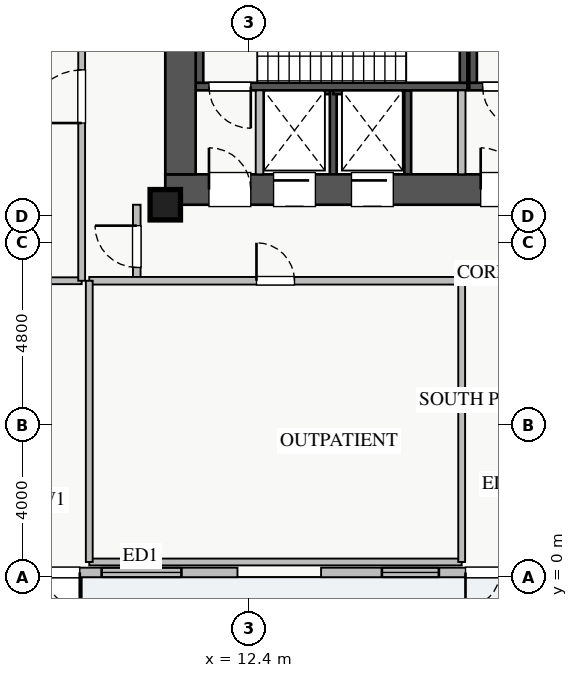
"""IFC4 building model, lengths in metres.
Left out: names, types, materials, properties, quantities, classifications, styles, units other than length and angle.
Written with IfcOpenShell. Run it as: python <this file> out.ifc"""

import sys

from ifc_helpers import new_model, si_unit, direction, frame, frame_2d, origin, origin_2d, place, context, subcontext, project, spatial, rectangle, extrude, source, transform, mapped, element, fill, save


model = new_model("IFC4")
c1 = context("Model", 3, precision=1e-05, world=origin(), true_north=direction((0.0, 1.0)))
c2 = subcontext(c1, "Body", "Model", "MODEL_VIEW")
j1 = project(units=[si_unit("LENGTHUNIT", "METRE"), si_unit("PLANEANGLEUNIT", "RADIAN")], contexts=[c1])
p1 = place(None, origin())
s1 = spatial("IfcSite", under=j1, at=p1, CompositionType="ELEMENT")
p2 = place(p1, origin())
s2 = spatial("IfcBuilding", under=s1, at=p2, CompositionType="ELEMENT")
p3 = place(p2, origin())
s3 = spatial("IfcBuildingStorey", under=s2, at=p3, CompositionType="ELEMENT", Elevation=0.0)
p4 = place(p3, frame((12.68, 12.8, 0.0), z_axis=(0.0, 0.0, 1.0), x_axis=(1.0, 0.0, 0.0)))
e1 = element("IfcWall", 1, at=p4, inside=s3, PredefinedType="SHEAR", context=c2, shape_type="SweptSolid", body=[
    extrude(rectangle(XDim=1.94, YDim=0.18, at=frame_2d((0.97, 0.0))), origin(), (0.0, 0.0, 1.0), 4.78),
])
p5 = place(p3, frame((14.62, 10.6, 0.0), z_axis=(0.0, 0.0, 1.0), x_axis=(0.0, 1.0, 0.0)))
e2 = element("IfcWall", 2, at=p5, inside=s3, PredefinedType="SHEAR", context=c2, shape_type="SweptSolid", body=[
    extrude(rectangle(XDim=2.2, YDim=0.18, at=frame_2d((1.1, 0.0))), origin(), (0.0, 0.0, 1.0), 4.78),
])
p6 = place(p3, frame((14.62, 12.8, 0.0), z_axis=(0.0, 0.0, 1.0), x_axis=(1.0, 0.0, 0.0)))
e3 = element("IfcWall", 3, at=p6, inside=s3, PredefinedType="SHEAR", context=c2, shape_type="SweptSolid", body=[
    extrude(rectangle(XDim=1.96, YDim=0.18, at=frame_2d((0.98, 0.0))), origin(), (0.0, 0.0, 1.0), 4.78),
])
p7 = place(p3, frame((16.58, 10.6, 0.0), z_axis=(0.0, 0.0, 1.0), x_axis=(0.0, 1.0, 0.0)))
e4 = element("IfcWall", 4, at=p7, inside=s3, PredefinedType="SHEAR", context=c2, shape_type="SweptSolid", body=[
    extrude(rectangle(XDim=2.2, YDim=0.18, at=frame_2d((1.1, 0.0))), origin(), (0.0, 0.0, 1.0), 4.78),
])
p8 = place(p3, frame((11.0, 12.91, 0.0), z_axis=(0.0, 0.0, 1.0), x_axis=(1.0, 0.0, 0.0)))
e5 = element("IfcWall", 5, at=p8, inside=s3, PredefinedType="SHEAR", context=c2, shape_type="SweptSolid", body=[
    extrude(rectangle(XDim=7.15, YDim=0.2, at=frame_2d((3.575, 0.0))), origin(), (0.0, 0.0, 1.0), 5.0),
])
p9 = place(p8, frame((0.35, 0.0, 0.0)))
e6 = element("IfcOpeningElement", 6, at=p9, cuts=e5, PredefinedType="OPENING", context=c2, shape_type="SweptSolid", body=[
    extrude(rectangle(XDim=1.1, YDim=2.05, at=frame_2d((0.55, 1.025))), frame((0.0, 0.11, 0.0), z_axis=(0.0, -1.0, 0.0), x_axis=(1.0, 0.0, 0.0)), (0.0, 0.0, 1.0), 0.22),
])
for number, where, z_axis, x_axis in (
    (7, (11.1, 13.01, 0.0), (0.0, 0.0, 1.0), (0.0, 1.0, 0.0)),
    (8, (18.05, 13.01, 0.0), (0.0, 0.0, 1.0), (0.0, 1.0, 0.0)),
):
    element("IfcWall", number, at=place(p3, frame(where, z_axis=z_axis, x_axis=x_axis)), inside=s3, PredefinedType="SHEAR", context=c2, shape_type="SweptSolid", body=[
        extrude(rectangle(XDim=2.94, YDim=0.2, at=frame_2d((1.47, 0.0))), origin(), (0.0, 0.0, 1.0), 5.0),
    ])
p10 = place(p3, frame((18.2, 12.91, 0.0), z_axis=(0.0, 0.0, 1.0), x_axis=(1.0, 0.0, 0.0)))
e9 = element("IfcWall", 9, at=p10, inside=s3, PredefinedType="SHEAR", context=c2, shape_type="SweptSolid", body=[
    extrude(rectangle(XDim=7.15, YDim=0.2, at=frame_2d((3.575, 0.0))), origin(), (0.0, 0.0, 1.0), 5.0),
])
p11 = place(p10, frame((0.35, 0.0, 0.0)))
e10 = element("IfcOpeningElement", 10, at=p11, cuts=e9, PredefinedType="OPENING", context=c2, shape_type="SweptSolid", body=[
    extrude(rectangle(XDim=1.1, YDim=2.05, at=frame_2d((0.55, 1.025))), frame((0.0, 0.11, 0.0), z_axis=(0.0, -1.0, 0.0), x_axis=(1.0, 0.0, 0.0)), (0.0, 0.0, 1.0), 0.22),
])
p12 = place(p3, frame((18.3, 13.01, 0.0), z_axis=(0.0, 0.0, 1.0), x_axis=(0.0, 1.0, 0.0)))
e11 = element("IfcWall", 11, at=p12, inside=s3, PredefinedType="SHEAR", context=c2, shape_type="SweptSolid", body=[
    extrude(rectangle(XDim=2.94, YDim=0.2, at=frame_2d((1.47, 0.0))), origin(), (0.0, 0.0, 1.0), 5.0),
])
p13 = place(p3, frame((10.2, 10.2, 0.0), z_axis=(0.0, 0.0, 1.0), x_axis=(1.0, 0.0, 0.0)))
e12 = element("IfcWall", 12, at=p13, inside=s3, PredefinedType="SHEAR", context=c2, shape_type="SweptSolid", body=[
    extrude(rectangle(XDim=17.6, YDim=0.8, at=frame_2d((8.8, 0.0))), origin(), (0.0, 0.0, 1.0), 5.0),
])
p14 = place(p13, frame((1.15, 0.0, 0.0)))
e13 = element("IfcOpeningElement", 13, at=p14, cuts=e12, PredefinedType="OPENING", context=c2, shape_type="SweptSolid", body=[
    extrude(rectangle(XDim=1.1, YDim=2.05, at=frame_2d((0.55, 1.025))), frame((0.0, 0.41, 0.0), z_axis=(0.0, -1.0, 0.0), x_axis=(1.0, 0.0, 0.0)), (0.0, 0.0, 1.0), 0.82),
])
p15 = place(p13, frame((8.3, 0.0, 0.0)))
e14 = element("IfcOpeningElement", 14, at=p15, cuts=e12, PredefinedType="OPENING", context=c2, shape_type="SweptSolid", body=[
    extrude(rectangle(XDim=1.1, YDim=2.05, at=frame_2d((0.55, 1.025))), frame((0.0, 0.41, 0.0), z_axis=(0.0, -1.0, 0.0), x_axis=(1.0, 0.0, 0.0)), (0.0, 0.0, 1.0), 0.82),
])
p16 = place(p13, frame((10.05, 0.0, 0.0)))
e15 = element("IfcOpeningElement", 15, at=p16, cuts=e12, PredefinedType="OPENING", context=c2, shape_type="SweptSolid", body=[
    extrude(rectangle(XDim=1.1, YDim=2.05, at=frame_2d((0.55, 1.025))), frame((0.0, 0.41, 0.0), z_axis=(0.0, -1.0, 0.0), x_axis=(1.0, 0.0, 0.0)), (0.0, 0.0, 1.0), 0.82),
])
p17 = place(p13, frame((4.9, 0.0, 0.0)))
e16 = element("IfcOpeningElement", 16, at=p17, cuts=e12, PredefinedType="OPENING", context=c2, shape_type="SweptSolid", body=[
    extrude(rectangle(XDim=1.1, YDim=2.05, at=frame_2d((0.55, 1.025))), frame((0.0, 0.41, 0.0), z_axis=(0.0, -1.0, 0.0), x_axis=(1.0, 0.0, 0.0)), (0.0, 0.0, 1.0), 0.82),
])
p18 = place(p13, frame((2.85, 0.0, 0.0)))
e17 = element("IfcOpeningElement", 17, at=p18, cuts=e12, PredefinedType="OPENING", context=c2, shape_type="SweptSolid", body=[
    extrude(rectangle(XDim=1.1, YDim=2.05, at=frame_2d((0.55, 1.025))), frame((0.0, 0.41, 0.0), z_axis=(0.0, -1.0, 0.0), x_axis=(1.0, 0.0, 0.0)), (0.0, 0.0, 1.0), 0.82),
])
p19 = place(p13, frame((14.74, 0.0, 0.0)))
e18 = element("IfcOpeningElement", 18, at=p19, cuts=e12, PredefinedType="OPENING", context=c2, shape_type="SweptSolid", body=[
    extrude(rectangle(XDim=1.0, YDim=2.05, at=frame_2d((0.5, 1.025))), frame((0.0, 0.41, 0.0), z_axis=(0.0, -1.0, 0.0), x_axis=(1.0, 0.0, 0.0)), (0.0, 0.0, 1.0), 0.82),
])
p20 = place(p13, frame((11.945, 0.0, 0.0)))
e19 = element("IfcOpeningElement", 19, at=p20, cuts=e12, PredefinedType="OPENING", context=c2, shape_type="SweptSolid", body=[
    extrude(rectangle(XDim=1.0, YDim=2.05, at=frame_2d((0.5, 1.025))), frame((0.0, 0.41, 0.0), z_axis=(0.0, -1.0, 0.0), x_axis=(1.0, 0.0, 0.0)), (0.0, 0.0, 1.0), 0.82),
])
p21 = place(p13, frame((13.48, 0.0, 0.0)))
e20 = element("IfcOpeningElement", 20, at=p21, cuts=e12, PredefinedType="OPENING", context=c2, shape_type="SweptSolid", body=[
    extrude(rectangle(XDim=1.0, YDim=2.05, at=frame_2d((0.5, 1.025))), frame((0.0, 0.41, 0.0), z_axis=(0.0, -1.0, 0.0), x_axis=(1.0, 0.0, 0.0)), (0.0, 0.0, 1.0), 0.82),
])
p22 = place(p3, frame((10.6, 10.6, 0.0), z_axis=(0.0, 0.0, 1.0), x_axis=(0.0, 1.0, 0.0)))
e21 = element("IfcWall", 21, at=p22, inside=s3, PredefinedType="SHEAR", context=c2, shape_type="SweptSolid", body=[
    extrude(rectangle(XDim=5.6, YDim=0.8, at=frame_2d((2.8, 0.0))), origin(), (0.0, 0.0, 1.0), 5.0),
])
m1 = source(origin(), c2, "Body", "SweptSolid", [
    extrude(rectangle(XDim=0.8, YDim=0.8, at=origin_2d()), origin(), (0.0, 0.0, 1.0), 5.0),
])
p23 = place(p3, frame((10.2, 9.8, 0.0), z_axis=(0.0, 0.0, 1.0), x_axis=(1.0, 0.0, 0.0)))
e22 = element("IfcColumn", 22, at=p23, inside=s3, PredefinedType="PILASTER", context=c2, shape_type="MappedRepresentation", body=[
    mapped(m1, transform((0.0, 0.0, 0.0), x_axis=(1.0, 0.0, 0.0), y_axis=(0.0, 1.0, 0.0), z_axis=(0.0, 0.0, 1.0), scale=1.0)),
])
p24 = place(p3, frame((2.0, 0.125, 0.0), z_axis=(0.0, 0.0, 1.0), x_axis=(1.0, 0.0, 0.0)))
e23 = element("IfcWall", 23, at=p24, inside=s3, PredefinedType="STANDARD", context=c2, shape_type="SweptSolid", body=[
    extrude(rectangle(XDim=10.1, YDim=0.25, at=frame_2d((5.05, 0.0))), origin(), (0.0, 0.0, 1.0), 4.32),
])
p25 = place(p24, frame((4.15, 0.0, 0.0)))
e24 = element("IfcOpeningElement", 24, at=p25, cuts=e23, PredefinedType="OPENING", context=c2, shape_type="SweptSolid", body=[
    extrude(rectangle(XDim=1.8, YDim=2.2, at=frame_2d((0.9, 1.1))), frame((0.0, 0.135, 0.0), z_axis=(0.0, -1.0, 0.0), x_axis=(1.0, 0.0, 0.0)), (0.0, 0.0, 1.0), 0.27),
])
p26 = place(p24, frame((1.775, 0.0, 0.9)))
e25 = element("IfcOpeningElement", 25, at=p26, cuts=e23, PredefinedType="OPENING", context=c2, shape_type="SweptSolid", body=[
    extrude(rectangle(XDim=1.5, YDim=1.45, at=frame_2d((0.75, 0.725))), frame((0.0, 0.135, 0.0), z_axis=(0.0, -1.0, 0.0), x_axis=(1.0, 0.0, 0.0)), (0.0, 0.0, 1.0), 0.27),
])
p27 = place(p24, frame((6.525, 0.0, 0.9)))
e26 = element("IfcOpeningElement", 26, at=p27, cuts=e23, PredefinedType="OPENING", context=c2, shape_type="SweptSolid", body=[
    extrude(rectangle(XDim=2.1, YDim=1.48, at=frame_2d((1.05, 0.74))), frame((0.0, 0.135, 0.0), z_axis=(0.0, -1.0, 0.0), x_axis=(1.0, 0.0, 0.0)), (0.0, 0.0, 1.0), 0.27),
])
p28 = place(p3, frame((14.3, 0.125, 0.0), z_axis=(0.0, 0.0, 1.0), x_axis=(1.0, 0.0, 0.0)))
e27 = element("IfcWall", 27, at=p28, inside=s3, PredefinedType="STANDARD", context=c2, shape_type="SweptSolid", body=[
    extrude(rectangle(XDim=9.4, YDim=0.25, at=frame_2d((4.7, 0.0))), origin(), (0.0, 0.0, 1.0), 4.32),
])
p29 = place(p28, frame((3.8, 0.0, 0.0)))
e28 = element("IfcOpeningElement", 28, at=p29, cuts=e27, PredefinedType="OPENING", context=c2, shape_type="SweptSolid", body=[
    extrude(rectangle(XDim=1.8, YDim=2.2, at=frame_2d((0.9, 1.1))), frame((0.0, 0.135, 0.0), z_axis=(0.0, -1.0, 0.0), x_axis=(1.0, 0.0, 0.0)), (0.0, 0.0, 1.0), 0.27),
])
p30 = place(p28, frame((1.6, 0.0, 0.9)))
e29 = element("IfcOpeningElement", 29, at=p30, cuts=e27, PredefinedType="OPENING", context=c2, shape_type="SweptSolid", body=[
    extrude(rectangle(XDim=1.5, YDim=1.45, at=frame_2d((0.75, 0.725))), frame((0.0, 0.135, 0.0), z_axis=(0.0, -1.0, 0.0), x_axis=(1.0, 0.0, 0.0)), (0.0, 0.0, 1.0), 0.27),
])
p31 = place(p28, frame((6.75, 0.0, 0.9)))
e30 = element("IfcOpeningElement", 30, at=p31, cuts=e27, PredefinedType="OPENING", context=c2, shape_type="SweptSolid", body=[
    extrude(rectangle(XDim=2.1, YDim=1.5, at=frame_2d((1.05, 0.75))), frame((0.0, 0.135, 0.0), z_axis=(0.0, -1.0, 0.0), x_axis=(1.0, 0.0, 0.0)), (0.0, 0.0, 1.0), 0.27),
])
for number, where, z_axis, x_axis in (
    (31, (12.68, 10.6, 0.0), (0.0, 0.0, 1.0), (0.0, 1.0, 0.0)),
    (32, (18.0, 10.6, 0.0), (0.0, 0.0, 1.0), (0.0, 1.0, 0.0)),
):
    element("IfcWall", number, at=place(p3, frame(where, z_axis=z_axis, x_axis=x_axis)), inside=s3, PredefinedType="PARTITIONING", context=c2, shape_type="SweptSolid", body=[
        extrude(rectangle(XDim=2.21, YDim=0.2, at=frame_2d((1.105, 0.0))), origin(), (0.0, 0.0, 1.0), 4.78),
    ])
p32 = place(p3, frame((9.45, 7.8, 0.0), z_axis=(0.0, 0.0, 1.0), x_axis=(0.0, 1.0, 0.0)))
e33 = element("IfcWall", 33, at=p32, inside=s3, PredefinedType="PARTITIONING", context=c2, shape_type="SweptSolid", body=[
    extrude(rectangle(XDim=2.0, YDim=0.2, at=frame_2d((1.0, 0.0))), origin(), (0.0, 0.0, 1.0), 4.78),
])
p33 = place(p32, frame((0.35, 0.0, 0.0)))
e34 = element("IfcOpeningElement", 34, at=p33, cuts=e33, PredefinedType="OPENING", context=c2, shape_type="SweptSolid", body=[
    extrude(rectangle(XDim=1.1, YDim=2.05, at=frame_2d((0.55, 1.025))), frame((0.0, 0.11, 0.0), z_axis=(0.0, -1.0, 0.0), x_axis=(1.0, 0.0, 0.0)), (0.0, 0.0, 1.0), 0.22),
])
p34 = place(p3, frame((8.2, 7.8, 0.0), z_axis=(0.0, 0.0, 1.0), x_axis=(1.0, 0.0, 0.0)))
e35 = element("IfcWall", 35, at=p34, inside=s3, PredefinedType="PARTITIONING", context=c2, shape_type="SweptSolid", body=[
    extrude(rectangle(XDim=9.8, YDim=0.2, at=frame_2d((4.9, 0.0))), origin(), (0.0, 0.0, 1.0), 4.78),
])
p35 = place(p34, frame((4.4, 0.0, 0.0)))
e36 = element("IfcOpeningElement", 36, at=p35, cuts=e35, PredefinedType="OPENING", context=c2, shape_type="SweptSolid", body=[
    extrude(rectangle(XDim=1.0, YDim=2.05, at=frame_2d((0.5, 1.025))), frame((0.0, 0.11, 0.0), z_axis=(0.0, -1.0, 0.0), x_axis=(1.0, 0.0, 0.0)), (0.0, 0.0, 1.0), 0.22),
])
p36 = place(p3, frame((0.4, 7.8, 0.0), z_axis=(0.0, 0.0, 1.0), x_axis=(1.0, 0.0, 0.0)))
e37 = element("IfcWall", 37, at=p36, inside=s3, PredefinedType="PARTITIONING", context=c2, shape_type="SweptSolid", body=[
    extrude(rectangle(XDim=7.6, YDim=0.18, at=frame_2d((3.8, 0.0))), origin(), (0.0, 0.0, 1.0), 4.78),
])
p37 = place(p3, frame((8.0, 7.8, 0.0), z_axis=(0.0, 0.0, 1.0), x_axis=(0.0, 1.0, 0.0)))
e38 = element("IfcWall", 38, at=p37, inside=s3, PredefinedType="PARTITIONING", context=c2, shape_type="SweptSolid", body=[
    extrude(rectangle(XDim=9.7, YDim=0.18, at=frame_2d((4.85, 0.0))), origin(), (0.0, 0.0, 1.0), 4.78),
])
p38 = place(p37, frame((4.15, 0.0, 0.0)))
e39 = element("IfcOpeningElement", 39, at=p38, cuts=e38, PredefinedType="OPENING", context=c2, shape_type="SweptSolid", body=[
    extrude(rectangle(XDim=1.4, YDim=2.05, at=frame_2d((0.7, 1.025))), frame((0.0, 0.1, 0.0), z_axis=(0.0, -1.0, 0.0), x_axis=(1.0, 0.0, 0.0)), (0.0, 0.0, 1.0), 0.2),
])
p39 = place(p3, frame((8.2, 0.4, 0.0), z_axis=(0.0, 0.0, 1.0), x_axis=(1.0, 0.0, 0.0)))
e40 = element("IfcWall", 40, at=p39, inside=s3, PredefinedType="PARTITIONING", context=c2, shape_type="SweptSolid", body=[
    extrude(rectangle(XDim=9.8, YDim=0.18, at=frame_2d((4.9, 0.0))), origin(), (0.0, 0.0, 1.0), 4.78),
])
for number, where, z_axis, x_axis in (
    (41, (8.2, 0.4, 0.0), (0.0, 0.0, 1.0), (0.0, 1.0, 0.0)),
    (42, (18.0, 0.4, 0.0), (0.0, 0.0, 1.0), (0.0, 1.0, 0.0)),
):
    element("IfcWall", number, at=place(p3, frame(where, z_axis=z_axis, x_axis=x_axis)), inside=s3, PredefinedType="PARTITIONING", context=c2, shape_type="SweptSolid", body=[
        extrude(rectangle(XDim=7.4, YDim=0.18, at=frame_2d((3.7, 0.0))), origin(), (0.0, 0.0, 1.0), 4.78),
    ])
m2 = source(origin(), c2, "Body", "SweptSolid", [
    extrude(rectangle(XDim=1.8, YDim=2.2, at=frame_2d((0.9, 1.1))), frame((0.0, 0.025, 0.0), z_axis=(0.0, -1.0, 0.0), x_axis=(1.0, 0.0, 0.0)), (0.0, 0.0, 1.0), 0.05),
])
p40 = place(p25, frame((1.8, 0.0, 0.0), z_axis=(0.0, 0.0, 1.0), x_axis=(-1.0, 0.0, 0.0)))
e43 = element("IfcDoor", 43, at=p40, inside=s3, OperationType="DOUBLE_DOOR_SINGLE_SWING", PredefinedType="DOOR", context=c2, shape_type="MappedRepresentation", body=[
    mapped(m2, transform((0.0, 0.0, 0.0), x_axis=(1.0, 0.0, 0.0), y_axis=(0.0, 1.0, 0.0), z_axis=(0.0, 0.0, 1.0), scale=1.0)),
])
fill(e24, e43)
m3 = source(origin(), c2, "Body", "SweptSolid", [
    extrude(rectangle(XDim=2.1, YDim=1.48, at=frame_2d((1.05, 0.74))), frame((0.0, 0.03, 0.0), z_axis=(0.0, -1.0, 0.0), x_axis=(1.0, 0.0, 0.0)), (0.0, 0.0, 1.0), 0.06),
])
p41 = place(p27, origin())
e44 = element("IfcWindow", 44, at=p41, inside=s3, PartitioningType="TRIPLE_PANEL_VERTICAL", PredefinedType="WINDOW", context=c2, shape_type="MappedRepresentation", body=[
    mapped(m3, transform((0.0, 0.0, 0.0), x_axis=(1.0, 0.0, 0.0), y_axis=(0.0, 1.0, 0.0), z_axis=(0.0, 0.0, 1.0), scale=1.0)),
])
fill(e26, e44)
p42 = place(p29, frame((1.8, 0.0, 0.0), z_axis=(0.0, 0.0, 1.0), x_axis=(-1.0, 0.0, 0.0)))
e45 = element("IfcDoor", 45, at=p42, inside=s3, OperationType="DOUBLE_DOOR_SINGLE_SWING", PredefinedType="DOOR", context=c2, shape_type="MappedRepresentation", body=[
    mapped(m2, transform((0.0, 0.0, 0.0), x_axis=(1.0, 0.0, 0.0), y_axis=(0.0, 1.0, 0.0), z_axis=(0.0, 0.0, 1.0), scale=1.0)),
])
fill(e28, e45)
m4 = source(origin(), c2, "Body", "SweptSolid", [
    extrude(rectangle(XDim=1.5, YDim=1.45, at=frame_2d((0.75, 0.725))), frame((0.0, 0.03, 0.0), z_axis=(0.0, -1.0, 0.0), x_axis=(1.0, 0.0, 0.0)), (0.0, 0.0, 1.0), 0.06),
])
p43 = place(p30, origin())
e46 = element("IfcWindow", 46, at=p43, inside=s3, PartitioningType="DOUBLE_PANEL_VERTICAL", PredefinedType="WINDOW", context=c2, shape_type="MappedRepresentation", body=[
    mapped(m4, transform((0.0, 0.0, 0.0), x_axis=(1.0, 0.0, 0.0), y_axis=(0.0, 1.0, 0.0), z_axis=(0.0, 0.0, 1.0), scale=1.0)),
])
fill(e29, e46)
m5 = source(origin(), c2, "Body", "SweptSolid", [
    extrude(rectangle(XDim=1.1, YDim=2.05, at=frame_2d((0.55, 1.025))), frame((0.0, 0.025, 0.0), z_axis=(0.0, -1.0, 0.0), x_axis=(1.0, 0.0, 0.0)), (0.0, 0.0, 1.0), 0.05),
])
p44 = place(p14, origin())
e47 = element("IfcDoor", 47, at=p44, inside=s3, OperationType="SINGLE_SWING_LEFT", PredefinedType="DOOR", context=c2, shape_type="MappedRepresentation", body=[
    mapped(m5, transform((0.0, 0.0, 0.0), x_axis=(1.0, 0.0, 0.0), y_axis=(0.0, 1.0, 0.0), z_axis=(0.0, 0.0, 1.0), scale=1.0)),
])
fill(e13, e47)
p45 = place(p9, frame((1.1, 0.0, 0.0), z_axis=(0.0, 0.0, 1.0), x_axis=(-1.0, 0.0, 0.0)))
e48 = element("IfcDoor", 48, at=p45, inside=s3, OperationType="SINGLE_SWING_RIGHT", PredefinedType="DOOR", context=c2, shape_type="MappedRepresentation", body=[
    mapped(m5, transform((0.0, 0.0, 0.0), x_axis=(1.0, 0.0, 0.0), y_axis=(0.0, 1.0, 0.0), z_axis=(0.0, 0.0, 1.0), scale=1.0)),
])
fill(e6, e48)
p46 = place(p15, origin())
e49 = element("IfcDoor", 49, at=p46, inside=s3, OperationType="SINGLE_SWING_LEFT", PredefinedType="DOOR", context=c2, shape_type="MappedRepresentation", body=[
    mapped(m5, transform((0.0, 0.0, 0.0), x_axis=(1.0, 0.0, 0.0), y_axis=(0.0, 1.0, 0.0), z_axis=(0.0, 0.0, 1.0), scale=1.0)),
])
fill(e14, e49)
p47 = place(p11, frame((1.1, 0.0, 0.0), z_axis=(0.0, 0.0, 1.0), x_axis=(-1.0, 0.0, 0.0)))
e50 = element("IfcDoor", 50, at=p47, inside=s3, OperationType="SINGLE_SWING_RIGHT", PredefinedType="DOOR", context=c2, shape_type="MappedRepresentation", body=[
    mapped(m5, transform((0.0, 0.0, 0.0), x_axis=(1.0, 0.0, 0.0), y_axis=(0.0, 1.0, 0.0), z_axis=(0.0, 0.0, 1.0), scale=1.0)),
])
fill(e10, e50)
p48 = place(p17, origin())
e51 = element("IfcDoor", 51, at=p48, inside=s3, OperationType="SLIDING_TO_RIGHT", PredefinedType="DOOR", context=c2, shape_type="MappedRepresentation", body=[
    mapped(m5, transform((0.0, 0.0, 0.0), x_axis=(1.0, 0.0, 0.0), y_axis=(0.0, 1.0, 0.0), z_axis=(0.0, 0.0, 1.0), scale=1.0)),
])
fill(e16, e51)
p49 = place(p18, origin())
e52 = element("IfcDoor", 52, at=p49, inside=s3, OperationType="SLIDING_TO_RIGHT", PredefinedType="DOOR", context=c2, shape_type="MappedRepresentation", body=[
    mapped(m5, transform((0.0, 0.0, 0.0), x_axis=(1.0, 0.0, 0.0), y_axis=(0.0, 1.0, 0.0), z_axis=(0.0, 0.0, 1.0), scale=1.0)),
])
fill(e17, e52)
p50 = place(p33, origin())
e53 = element("IfcDoor", 53, at=p50, inside=s3, OperationType="SINGLE_SWING_RIGHT", PredefinedType="DOOR", context=c2, shape_type="MappedRepresentation", body=[
    mapped(m5, transform((0.0, 0.0, 0.0), x_axis=(1.0, 0.0, 0.0), y_axis=(0.0, 1.0, 0.0), z_axis=(0.0, 0.0, 1.0), scale=1.0)),
])
fill(e34, e53)
m6 = source(origin(), c2, "Body", "SweptSolid", [
    extrude(rectangle(XDim=1.0, YDim=2.05, at=frame_2d((0.5, 1.025))), frame((0.0, 0.025, 0.0), z_axis=(0.0, -1.0, 0.0), x_axis=(1.0, 0.0, 0.0)), (0.0, 0.0, 1.0), 0.05),
])
p51 = place(p35, origin())
e54 = element("IfcDoor", 54, at=p51, inside=s3, OperationType="SINGLE_SWING_LEFT", PredefinedType="DOOR", context=c2, shape_type="MappedRepresentation", body=[
    mapped(m6, transform((0.0, 0.0, 0.0), x_axis=(1.0, 0.0, 0.0), y_axis=(0.0, 1.0, 0.0), z_axis=(0.0, 0.0, 1.0), scale=1.0)),
])
fill(e36, e54)
m7 = source(origin(), c2, "Body", "SweptSolid", [
    extrude(rectangle(XDim=1.4, YDim=2.05, at=frame_2d((0.7, 1.025))), frame((0.0, 0.025, 0.0), z_axis=(0.0, -1.0, 0.0), x_axis=(1.0, 0.0, 0.0)), (0.0, 0.0, 1.0), 0.05),
])
p52 = place(p38, origin())
e55 = element("IfcDoor", 55, at=p52, inside=s3, OperationType="SINGLE_SWING_LEFT", PredefinedType="DOOR", context=c2, shape_type="MappedRepresentation", body=[
    mapped(m7, transform((0.0, 0.0, 0.0), x_axis=(1.0, 0.0, 0.0), y_axis=(0.0, 1.0, 0.0), z_axis=(0.0, 0.0, 1.0), scale=1.0)),
])
fill(e39, e55)
save(model, sys.argv[1])
